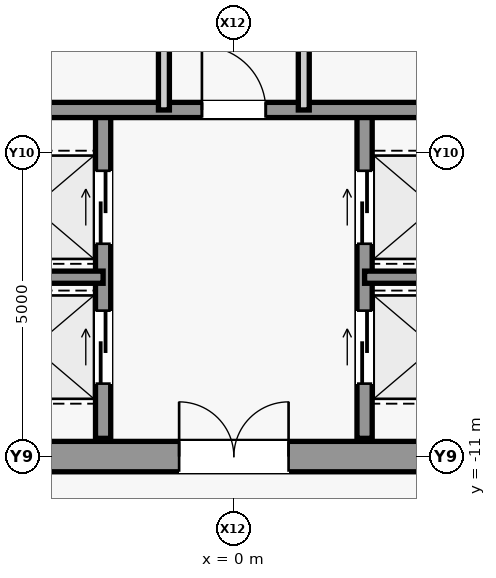
"""IFC4 building model, lengths in metres.
Left out: names, types, materials, properties, quantities, classifications, styles, units other than length and angle.
Written with IfcOpenShell. Run it as: python <this file> out.ifc"""

import sys

from ifc_helpers import new_model, si_unit, direction, frame, frame_2d, origin, place, context, subcontext, project, spatial, rectangle, extrude, source, transform, mapped, element, fill, save


model = new_model("IFC4")
c1 = context("Model", 3, precision=1e-05, world=origin(), true_north=direction((0.0, 1.0)))
c2 = subcontext(c1, "Body", "Model", "MODEL_VIEW")
j1 = project(units=[si_unit("LENGTHUNIT", "METRE"), si_unit("PLANEANGLEUNIT", "RADIAN")], contexts=[c1])
p1 = place(None, origin())
s1 = spatial("IfcSite", under=j1, at=p1, CompositionType="ELEMENT")
p2 = place(p1, origin())
s2 = spatial("IfcBuilding", under=s1, at=p2, CompositionType="ELEMENT")
p3 = place(p2, frame((0.0, 0.0, 45.2)))
s3 = spatial("IfcBuildingStorey", under=s2, at=p3, CompositionType="ELEMENT", Elevation=45.2)
m1 = source(origin(), c2, "Body", "SweptSolid", [
    extrude(rectangle(XDim=9.2, YDim=0.5, at=frame_2d((4.6, 0.0))), origin(), (0.0, 0.0, 1.0), 3.94),
])
p4 = place(p3, frame((-4.6, -11.0, 0.0), z_axis=(0.0, 0.0, 1.0), x_axis=(1.0, 0.0, 0.0)))
e1 = element("IfcWall", 1, at=p4, inside=s3, PredefinedType="SHEAR", context=c2, shape_type="MappedRepresentation", body=[
    mapped(m1, transform((0.0, 0.0, 0.0), scale=1.0)),
])
m2 = source(origin(), c2, "Body", "SweptSolid", [
    extrude(rectangle(XDim=1.8, YDim=2.25, at=frame_2d((0.9, 1.125))), frame((0.0, 0.26, 0.0), z_axis=(0.0, -1.0, 0.0), x_axis=(1.0, 0.0, 0.0)), (0.0, 0.0, 1.0), 0.52),
])
p5 = place(p4, frame((3.7, 0.0, 0.0)))
e2 = element("IfcOpeningElement", 2, at=p5, cuts=e1, PredefinedType="OPENING", context=c2, shape_type="MappedRepresentation", body=[
    mapped(m2, transform((0.0, 0.0, 0.0), scale=1.0)),
])
m3 = source(origin(), c2, "Body", "SweptSolid", [
    extrude(rectangle(XDim=5.4, YDim=0.25, at=frame_2d((2.7, 0.0))), origin(), (0.0, 0.0, 1.0), 3.94),
])
p6 = place(p3, frame((-2.15, -10.7, 0.0), z_axis=(0.0, 0.0, 1.0), x_axis=(0.0, 1.0, 0.0)))
e3 = element("IfcWall", 3, at=p6, inside=s3, PredefinedType="SHEAR", context=c2, shape_type="MappedRepresentation", body=[
    mapped(m3, transform((0.0, 0.0, 0.0), scale=1.0)),
])
m4 = source(origin(), c2, "Body", "SweptSolid", [
    extrude(rectangle(XDim=1.2, YDim=2.3, at=frame_2d((0.6, 1.15))), frame((0.0, 0.135, 0.0), z_axis=(0.0, -1.0, 0.0), x_axis=(1.0, 0.0, 0.0)), (0.0, 0.0, 1.0), 0.27),
])
p7 = place(p6, frame((0.9, 0.0, 0.0)))
e4 = element("IfcOpeningElement", 4, at=p7, cuts=e3, PredefinedType="OPENING", context=c2, shape_type="MappedRepresentation", body=[
    mapped(m4, transform((0.0, 0.0, 0.0), scale=1.0)),
])
p8 = place(p6, frame((3.2, 0.0, 0.0)))
e5 = element("IfcOpeningElement", 5, at=p8, cuts=e3, PredefinedType="OPENING", context=c2, shape_type="MappedRepresentation", body=[
    mapped(m4, transform((0.0, 0.0, 0.0), scale=1.0)),
])
p9 = place(p3, frame((2.15, -10.7, 0.0), z_axis=(0.0, 0.0, 1.0), x_axis=(0.0, 1.0, 0.0)))
e6 = element("IfcWall", 6, at=p9, inside=s3, PredefinedType="SHEAR", context=c2, shape_type="MappedRepresentation", body=[
    mapped(m3, transform((0.0, 0.0, 0.0), scale=1.0)),
])
p10 = place(p9, frame((0.9, 0.0, 0.0)))
e7 = element("IfcOpeningElement", 7, at=p10, cuts=e6, PredefinedType="OPENING", context=c2, shape_type="MappedRepresentation", body=[
    mapped(m4, transform((0.0, 0.0, 0.0), scale=1.0)),
])
p11 = place(p9, frame((3.2, 0.0, 0.0)))
e8 = element("IfcOpeningElement", 8, at=p11, cuts=e6, PredefinedType="OPENING", context=c2, shape_type="MappedRepresentation", body=[
    mapped(m4, transform((0.0, 0.0, 0.0), scale=1.0)),
])
m5 = source(origin(), c2, "Body", "SweptSolid", [
    extrude(rectangle(XDim=2.45, YDim=0.2, at=frame_2d((1.225, 0.0))), origin(), (0.0, 0.0, 1.0), 3.94),
])
for number, where, z_axis, x_axis in (
    (9, (-4.6, -8.05, 0.0), (0.0, 0.0, 1.0), (1.0, 0.0, 0.0)),
    (10, (2.15, -8.05, 0.0), (0.0, 0.0, 1.0), (1.0, 0.0, 0.0)),
):
    element("IfcWall", number, at=place(p3, frame(where, z_axis=z_axis, x_axis=x_axis)), inside=s3, PredefinedType="SHEAR", context=c2, shape_type="MappedRepresentation", body=[
        mapped(m5, transform((0.0, 0.0, 0.0), scale=1.0)),
    ])
m6 = source(origin(), c2, "Body", "SweptSolid", [
    extrude(rectangle(XDim=9.2, YDim=0.25, at=frame_2d((4.6, 0.0))), origin(), (0.0, 0.0, 1.0), 3.94),
])
p12 = place(p3, frame((-4.6, -5.3, 0.0), z_axis=(0.0, 0.0, 1.0), x_axis=(1.0, 0.0, 0.0)))
e11 = element("IfcWall", 11, at=p12, inside=s3, PredefinedType="SHEAR", context=c2, shape_type="MappedRepresentation", body=[
    mapped(m6, transform((0.0, 0.0, 0.0), scale=1.0)),
])
m7 = source(origin(), c2, "Body", "SweptSolid", [
    extrude(rectangle(XDim=1.05, YDim=2.2, at=frame_2d((0.525, 1.1))), frame((0.0, 0.135, 0.0), z_axis=(0.0, -1.0, 0.0), x_axis=(1.0, 0.0, 0.0)), (0.0, 0.0, 1.0), 0.27),
])
p13 = place(p12, frame((4.075, 0.0, 0.0)))
e12 = element("IfcOpeningElement", 12, at=p13, cuts=e11, PredefinedType="OPENING", context=c2, shape_type="MappedRepresentation", body=[
    mapped(m7, transform((0.0, 0.0, 0.0), scale=1.0)),
])
m8 = source(origin(), c2, "Body", "SweptSolid", [
    extrude(rectangle(XDim=10.6, YDim=0.18, at=frame_2d((5.3, 0.0))), origin(), (0.0, 0.0, 1.0), 3.94),
])
p14 = place(p3, frame((-1.15, -5.3, 0.0), z_axis=(0.0, 0.0, 1.0), x_axis=(0.0, 1.0, 0.0)))
e13 = element("IfcWall", 13, at=p14, inside=s3, PredefinedType="PARTITIONING", context=c2, shape_type="MappedRepresentation", body=[
    mapped(m8, transform((0.0, 0.0, 0.0), scale=1.0)),
])
m9 = source(origin(), c2, "Body", "SweptSolid", [
    extrude(rectangle(XDim=0.9, YDim=2.15, at=frame_2d((0.45, 1.075))), frame((0.0, 0.1, 0.0), z_axis=(0.0, -1.0, 0.0), x_axis=(1.0, 0.0, 0.0)), (0.0, 0.0, 1.0), 0.2),
])
p15 = place(p14, frame((4.2, 0.0, 0.0)))
e14 = element("IfcOpeningElement", 14, at=p15, cuts=e13, PredefinedType="OPENING", context=c2, shape_type="MappedRepresentation", body=[
    mapped(m9, transform((0.0, 0.0, 0.0), scale=1.0)),
])
p16 = place(p14, frame((9.475, 0.0, 0.0)))
e15 = element("IfcOpeningElement", 15, at=p16, cuts=e13, PredefinedType="OPENING", context=c2, shape_type="MappedRepresentation", body=[
    mapped(m9, transform((0.0, 0.0, 0.0), scale=1.0)),
])
p17 = place(p3, frame((1.15, -5.3, 0.0), z_axis=(0.0, 0.0, 1.0), x_axis=(0.0, 1.0, 0.0)))
e16 = element("IfcWall", 16, at=p17, inside=s3, PredefinedType="PARTITIONING", context=c2, shape_type="MappedRepresentation", body=[
    mapped(m8, transform((0.0, 0.0, 0.0), scale=1.0)),
])
p18 = place(p17, frame((1.15, 0.0, 0.0)))
e17 = element("IfcOpeningElement", 17, at=p18, cuts=e16, PredefinedType="OPENING", context=c2, shape_type="MappedRepresentation", body=[
    mapped(m9, transform((0.0, 0.0, 0.0), scale=1.0)),
])
p19 = place(p17, frame((4.6, 0.0, 0.0)))
e18 = element("IfcOpeningElement", 18, at=p19, cuts=e16, PredefinedType="OPENING", context=c2, shape_type="MappedRepresentation", body=[
    mapped(m9, transform((0.0, 0.0, 0.0), scale=1.0)),
])
p20 = place(p17, frame((7.65, 0.0, 0.0)))
e19 = element("IfcOpeningElement", 19, at=p20, cuts=e16, PredefinedType="OPENING", context=c2, shape_type="MappedRepresentation", body=[
    mapped(m9, transform((0.0, 0.0, 0.0), scale=1.0)),
])
p21 = place(p17, frame((9.475, 0.0, 0.0)))
e20 = element("IfcOpeningElement", 20, at=p21, cuts=e16, PredefinedType="OPENING", context=c2, shape_type="MappedRepresentation", body=[
    mapped(m9, transform((0.0, 0.0, 0.0), scale=1.0)),
])
m10 = source(origin(), c2, "Body", "SweptSolid", [
    extrude(rectangle(XDim=1.05, YDim=2.2, at=frame_2d((0.525, 1.1))), frame((0.0, 0.025, 0.0), z_axis=(0.0, -1.0, 0.0), x_axis=(1.0, 0.0, 0.0)), (0.0, 0.0, 1.0), 0.05),
])
p22 = place(p13, origin())
e21 = element("IfcDoor", 21, at=p22, inside=s3, OperationType="SINGLE_SWING_LEFT", PredefinedType="DOOR", context=c2, shape_type="MappedRepresentation", body=[
    mapped(m10, transform((0.0, 0.0, 0.0), scale=1.0)),
])
fill(e12, e21)
m11 = source(origin(), c2, "Body", "SweptSolid", [
    extrude(rectangle(XDim=1.8, YDim=2.25, at=frame_2d((0.9, 1.125))), frame((0.0, 0.025, 0.0), z_axis=(0.0, -1.0, 0.0), x_axis=(1.0, 0.0, 0.0)), (0.0, 0.0, 1.0), 0.05),
])
p23 = place(p5, origin())
e22 = element("IfcDoor", 22, at=p23, inside=s3, OperationType="SINGLE_SWING_LEFT", PredefinedType="DOOR", context=c2, shape_type="MappedRepresentation", body=[
    mapped(m11, transform((0.0, 0.0, 0.0), scale=1.0)),
])
fill(e2, e22)
m12 = source(origin(), c2, "Body", "SweptSolid", [
    extrude(rectangle(XDim=1.2, YDim=2.3, at=frame_2d((0.6, 1.15))), frame((0.0, 0.025, 0.0), z_axis=(0.0, -1.0, 0.0), x_axis=(1.0, 0.0, 0.0)), (0.0, 0.0, 1.0), 0.05),
])
p24 = place(p7, origin())
e23 = element("IfcDoor", 23, at=p24, inside=s3, OperationType="SLIDING_TO_LEFT", PredefinedType="DOOR", context=c2, shape_type="MappedRepresentation", body=[
    mapped(m12, transform((0.0, 0.0, 0.0), scale=1.0)),
])
fill(e4, e23)
p25 = place(p10, origin())
e24 = element("IfcDoor", 24, at=p25, inside=s3, OperationType="SLIDING_TO_LEFT", PredefinedType="DOOR", context=c2, shape_type="MappedRepresentation", body=[
    mapped(m12, transform((0.0, 0.0, 0.0), scale=1.0)),
])
fill(e7, e24)
p26 = place(p8, origin())
e25 = element("IfcDoor", 25, at=p26, inside=s3, OperationType="SLIDING_TO_LEFT", PredefinedType="DOOR", context=c2, shape_type="MappedRepresentation", body=[
    mapped(m12, transform((0.0, 0.0, 0.0), scale=1.0)),
])
fill(e5, e25)
p27 = place(p11, origin())
e26 = element("IfcDoor", 26, at=p27, inside=s3, OperationType="SLIDING_TO_LEFT", PredefinedType="DOOR", context=c2, shape_type="MappedRepresentation", body=[
    mapped(m12, transform((0.0, 0.0, 0.0), scale=1.0)),
])
fill(e8, e26)
save(model, sys.argv[1])
